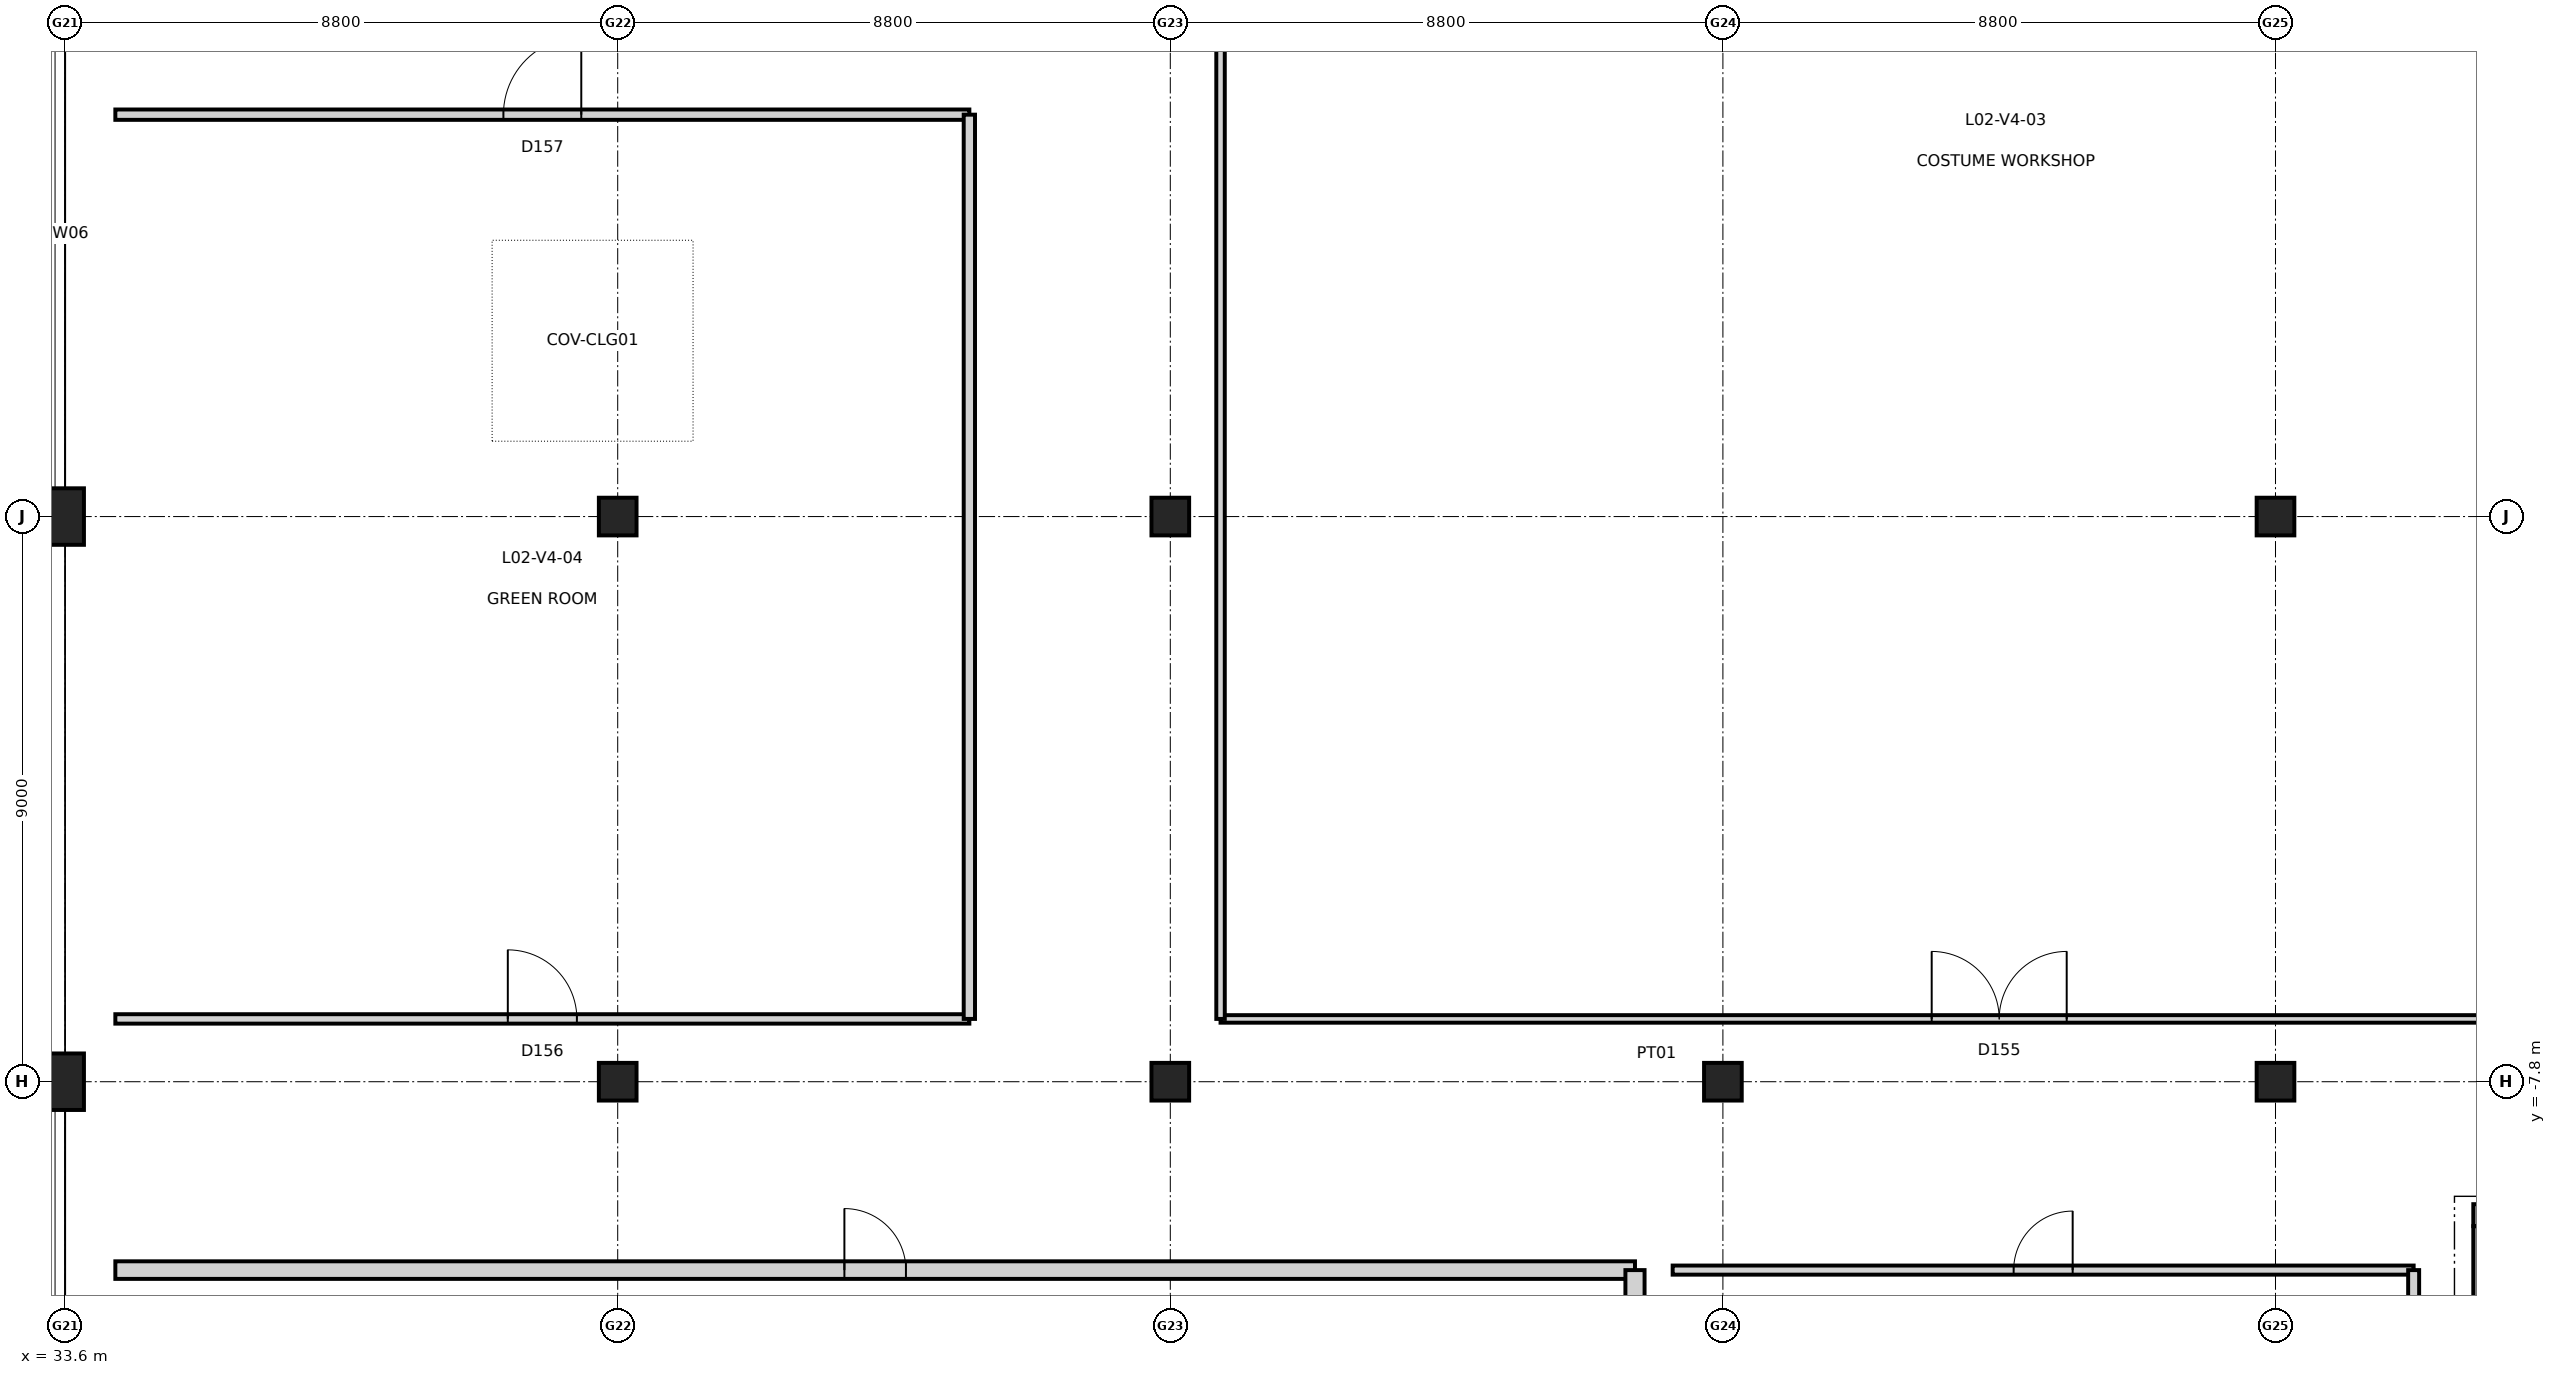
"""IFC4 building model, lengths in metres.
Left out: names, types, materials, properties, quantities, classifications, styles, units other than length and angle.
Written with IfcOpenShell. Run it as: python <this file> out.ifc"""

import sys

from ifc_helpers import new_model, si_unit, direction, frame, frame_2d, origin, origin_2d, place, context, subcontext, project, spatial, rectangle, extrude, element, fill, save


model = new_model("IFC4")
c1 = context("Model", 3, precision=1e-05, world=origin(), true_north=direction((0.0, 1.0)))
c2 = subcontext(c1, "Body", "Model", "MODEL_VIEW")
j1 = project(units=[si_unit("LENGTHUNIT", "METRE"), si_unit("PLANEANGLEUNIT", "RADIAN")], contexts=[c1])
p1 = place(None, origin())
s1 = spatial("IfcSite", under=j1, at=p1, CompositionType="ELEMENT")
p2 = place(p1, origin())
s2 = spatial("IfcBuilding", under=s1, at=p2, CompositionType="ELEMENT")
p3 = place(p2, frame((0.0, 0.0, 10.2)))
s3 = spatial("IfcBuildingStorey", under=s2, at=p3, CompositionType="ELEMENT", Elevation=10.2)
for number, where, z_axis, x_axis in (
    (1, (33.6, -7.8, 0.0), (0.0, 0.0, 1.0), (1.0, 0.0, 0.0)),
    (2, (33.6, 1.2, 0.0), (0.0, 0.0, 1.0), (1.0, 0.0, 0.0)),
):
    element("IfcColumn", number, at=place(p3, frame(where, z_axis=z_axis, x_axis=x_axis)), inside=s3, PredefinedType="COLUMN", context=c2, shape_type="SweptSolid", body=[
        extrude(rectangle(XDim=0.6, YDim=0.9, at=origin_2d()), origin(), (0.0, 0.0, 1.0), 4.8),
    ])
for number, where, z_axis, x_axis in (
    (3, (42.4, -7.8, 0.0), (0.0, 0.0, 1.0), (1.0, 0.0, 0.0)),
    (4, (42.4, 1.2, 0.0), (0.0, 0.0, 1.0), (1.0, 0.0, 0.0)),
    (5, (51.2, -7.8, 0.0), (0.0, 0.0, 1.0), (1.0, 0.0, 0.0)),
    (6, (51.2, 1.2, 0.0), (0.0, 0.0, 1.0), (1.0, 0.0, 0.0)),
    (7, (60.0, -7.8, 0.0), (0.0, 0.0, 1.0), (1.0, 0.0, 0.0)),
    (8, (68.8, -7.8, 0.0), (0.0, 0.0, 1.0), (1.0, 0.0, 0.0)),
    (9, (68.8, 1.2, 0.0), (0.0, 0.0, 1.0), (1.0, 0.0, 0.0)),
):
    element("IfcColumn", number, at=place(p3, frame(where, z_axis=z_axis, x_axis=x_axis)), inside=s3, PredefinedType="COLUMN", context=c2, shape_type="SweptSolid", body=[
        extrude(rectangle(XDim=0.6, YDim=0.6, at=origin_2d()), origin(), (0.0, 0.0, 1.0), 4.8),
    ])
p4 = place(p3, frame((72.125, -18.4, 0.0), z_axis=(0.0, 0.0, 1.0), x_axis=(0.0, 1.0, 0.0)))
e10 = element("IfcWall", 10, at=p4, inside=s3, PredefinedType="SHEAR", context=c2, shape_type="SweptSolid", body=[
    extrude(rectangle(XDim=8.3, YDim=0.35, at=frame_2d((4.15, 0.0))), origin(), (0.0, 0.0, 1.0), 4.8),
])
p5 = place(p4, frame((0.35, 0.0, 0.0)))
e11 = element("IfcOpeningElement", 11, at=p5, cuts=e10, PredefinedType="OPENING", context=c2, shape_type="SweptSolid", body=[
    extrude(rectangle(XDim=1.18, YDim=2.15, at=frame_2d((0.59, 1.075))), frame((0.0, 0.185, 0.0), z_axis=(0.0, -1.0, 0.0), x_axis=(1.0, 0.0, 0.0)), (0.0, 0.0, 1.0), 0.37),
])
p6 = place(p3, frame((71.95, -9.925, 0.0), z_axis=(0.0, 0.0, 1.0), x_axis=(1.0, 0.0, 0.0)))
e12 = element("IfcWall", 12, at=p6, inside=s3, PredefinedType="SHEAR", context=c2, shape_type="SweptSolid", body=[
    extrude(rectangle(XDim=4.6, YDim=0.35, at=frame_2d((2.3, 0.0))), origin(), (0.0, 0.0, 1.0), 4.8),
])
p7 = place(p3, frame((34.4, -10.8, 0.0), z_axis=(0.0, 0.0, 1.0), x_axis=(1.0, 0.0, 0.0)))
e13 = element("IfcWall", 13, at=p7, inside=s3, PredefinedType="PARTITIONING", context=c2, shape_type="SweptSolid", body=[
    extrude(rectangle(XDim=24.2, YDim=0.28, at=frame_2d((12.1, 0.0))), origin(), (0.0, 0.0, 1.0), 4.42),
])
p8 = place(p7, frame((11.61, 0.0, 0.0)))
e14 = element("IfcOpeningElement", 14, at=p8, cuts=e13, PredefinedType="OPENING", context=c2, shape_type="SweptSolid", body=[
    extrude(rectangle(XDim=0.98, YDim=2.15, at=frame_2d((0.49, 1.075))), frame((0.0, 0.15, 0.0), z_axis=(0.0, -1.0, 0.0), x_axis=(1.0, 0.0, 0.0)), (0.0, 0.0, 1.0), 0.3),
])
p9 = place(p3, frame((58.6, -28.0, 0.0), z_axis=(0.0, 0.0, 1.0), x_axis=(0.0, 1.0, 0.0)))
e15 = element("IfcWall", 15, at=p9, inside=s3, PredefinedType="PARTITIONING", context=c2, shape_type="SweptSolid", body=[
    extrude(rectangle(XDim=17.2, YDim=0.305, at=frame_2d((8.6, 0.0))), origin(), (0.0, 0.0, 1.0), 4.42),
])
p10 = place(p3, frame((59.2, -10.8, 0.0), z_axis=(0.0, 0.0, 1.0), x_axis=(1.0, 0.0, 0.0)))
e16 = element("IfcWall", 16, at=p10, inside=s3, PredefinedType="PARTITIONING", context=c2, shape_type="SweptSolid", body=[
    extrude(rectangle(XDim=11.8, YDim=0.145, at=frame_2d((5.9, 0.0))), origin(), (0.0, 0.0, 1.0), 4.42),
])
p11 = place(p10, frame((5.43, 0.0, 0.0)))
e17 = element("IfcOpeningElement", 17, at=p11, cuts=e16, PredefinedType="OPENING", context=c2, shape_type="SweptSolid", body=[
    extrude(rectangle(XDim=0.94, YDim=2.1, at=frame_2d((0.47, 1.05))), frame((0.0, 0.083, 0.0), z_axis=(0.0, -1.0, 0.0), x_axis=(1.0, 0.0, 0.0)), (0.0, 0.0, 1.0), 0.165),
])
p12 = place(p3, frame((71.0, -28.0, 0.0), z_axis=(0.0, 0.0, 1.0), x_axis=(0.0, 1.0, 0.0)))
e18 = element("IfcWall", 18, at=p12, inside=s3, PredefinedType="PARTITIONING", context=c2, shape_type="SweptSolid", body=[
    extrude(rectangle(XDim=17.2, YDim=0.175, at=frame_2d((8.6, 0.0))), origin(), (0.0, 0.0, 1.0), 4.42),
])
p13 = place(p3, frame((52.0, -6.8, 0.0), z_axis=(0.0, 0.0, 1.0), x_axis=(1.0, 0.0, 0.0)))
e19 = element("IfcWall", 19, at=p13, inside=s3, PredefinedType="PARTITIONING", context=c2, shape_type="SweptSolid", body=[
    extrude(rectangle(XDim=24.8, YDim=0.12, at=frame_2d((12.4, 0.0))), origin(), (0.0, 0.0, 1.0), 4.42),
])
p14 = place(p13, frame((11.325, 0.0, 0.0)))
e20 = element("IfcOpeningElement", 20, at=p14, cuts=e19, PredefinedType="OPENING", context=c2, shape_type="SweptSolid", body=[
    extrude(rectangle(XDim=2.15, YDim=2.4, at=frame_2d((1.075, 1.2))), frame((0.0, 0.07, 0.0), z_axis=(0.0, -1.0, 0.0), x_axis=(1.0, 0.0, 0.0)), (0.0, 0.0, 1.0), 0.14),
])
p15 = place(p3, frame((52.0, -6.8, 0.0), z_axis=(0.0, 0.0, 1.0), x_axis=(0.0, 1.0, 0.0)))
e21 = element("IfcWall", 21, at=p15, inside=s3, PredefinedType="PARTITIONING", context=c2, shape_type="SweptSolid", body=[
    extrude(rectangle(XDim=31.2, YDim=0.135, at=frame_2d((15.6, 0.0))), origin(), (0.0, 0.0, 1.0), 4.42),
])
p16 = place(p3, frame((34.4, -6.8, 0.0), z_axis=(0.0, 0.0, 1.0), x_axis=(1.0, 0.0, 0.0)))
e22 = element("IfcWall", 22, at=p16, inside=s3, PredefinedType="PARTITIONING", context=c2, shape_type="SweptSolid", body=[
    extrude(rectangle(XDim=13.6, YDim=0.15, at=frame_2d((6.8, 0.0))), origin(), (0.0, 0.0, 1.0), 4.42),
])
p17 = place(p16, frame((6.25, 0.0, 0.0)))
e23 = element("IfcOpeningElement", 23, at=p17, cuts=e22, PredefinedType="OPENING", context=c2, shape_type="SweptSolid", body=[
    extrude(rectangle(XDim=1.1, YDim=2.2, at=frame_2d((0.55, 1.1))), frame((0.0, 0.085, 0.0), z_axis=(0.0, -1.0, 0.0), x_axis=(1.0, 0.0, 0.0)), (0.0, 0.0, 1.0), 0.17),
])
p18 = place(p3, frame((34.4, 7.6, 0.0), z_axis=(0.0, 0.0, 1.0), x_axis=(1.0, 0.0, 0.0)))
e24 = element("IfcWall", 24, at=p18, inside=s3, PredefinedType="PARTITIONING", context=c2, shape_type="SweptSolid", body=[
    extrude(rectangle(XDim=13.6, YDim=0.165, at=frame_2d((6.8, 0.0))), origin(), (0.0, 0.0, 1.0), 4.42),
])
p19 = place(p18, frame((6.18, 0.0, 0.0)))
e25 = element("IfcOpeningElement", 25, at=p19, cuts=e24, PredefinedType="OPENING", context=c2, shape_type="SweptSolid", body=[
    extrude(rectangle(XDim=1.24, YDim=2.2, at=frame_2d((0.62, 1.1))), frame((0.0, 0.093, 0.0), z_axis=(0.0, -1.0, 0.0), x_axis=(1.0, 0.0, 0.0)), (0.0, 0.0, 1.0), 0.185),
])
p20 = place(p3, frame((48.0, -6.8, 0.0), z_axis=(0.0, 0.0, 1.0), x_axis=(0.0, 1.0, 0.0)))
e26 = element("IfcWall", 26, at=p20, inside=s3, PredefinedType="PARTITIONING", context=c2, shape_type="SweptSolid", body=[
    extrude(rectangle(XDim=14.4, YDim=0.18, at=frame_2d((7.2, 0.0))), origin(), (0.0, 0.0, 1.0), 3.977),
])
p21 = place(p8, origin())
e27 = element("IfcDoor", 27, at=p21, inside=s3, OperationType="SINGLE_SWING_LEFT", PredefinedType="DOOR", context=c2, shape_type="SweptSolid", body=[
    extrude(rectangle(XDim=0.98, YDim=2.15, at=frame_2d((0.49, 1.075))), frame((0.0, 0.025, 0.0), z_axis=(0.0, -1.0, 0.0), x_axis=(1.0, 0.0, 0.0)), (0.0, 0.0, 1.0), 0.05),
])
fill(e14, e27)
p22 = place(p11, origin())
e28 = element("IfcDoor", 28, at=p22, inside=s3, OperationType="SINGLE_SWING_RIGHT", PredefinedType="DOOR", context=c2, shape_type="SweptSolid", body=[
    extrude(rectangle(XDim=0.94, YDim=2.1, at=frame_2d((0.47, 1.05))), frame((0.0, 0.025, 0.0), z_axis=(0.0, -1.0, 0.0), x_axis=(1.0, 0.0, 0.0)), (0.0, 0.0, 1.0), 0.05),
])
fill(e17, e28)
p23 = place(p14, origin())
e29 = element("IfcDoor", 29, at=p23, inside=s3, OperationType="DOUBLE_DOOR_SINGLE_SWING", PredefinedType="DOOR", context=c2, shape_type="SweptSolid", body=[
    extrude(rectangle(XDim=2.15, YDim=2.4, at=frame_2d((1.075, 1.2))), frame((0.0, 0.025, 0.0), z_axis=(0.0, -1.0, 0.0), x_axis=(1.0, 0.0, 0.0)), (0.0, 0.0, 1.0), 0.05),
])
fill(e20, e29)
p24 = place(p17, origin())
e30 = element("IfcDoor", 30, at=p24, inside=s3, OperationType="SINGLE_SWING_LEFT", PredefinedType="DOOR", context=c2, shape_type="SweptSolid", body=[
    extrude(rectangle(XDim=1.1, YDim=2.2, at=frame_2d((0.55, 1.1))), frame((0.0, 0.025, 0.0), z_axis=(0.0, -1.0, 0.0), x_axis=(1.0, 0.0, 0.0)), (0.0, 0.0, 1.0), 0.05),
])
fill(e23, e30)
p25 = place(p19, origin())
e31 = element("IfcDoor", 31, at=p25, inside=s3, OperationType="SINGLE_SWING_RIGHT", PredefinedType="DOOR", context=c2, shape_type="SweptSolid", body=[
    extrude(rectangle(XDim=1.24, YDim=2.2, at=frame_2d((0.62, 1.1))), frame((0.0, 0.025, 0.0), z_axis=(0.0, -1.0, 0.0), x_axis=(1.0, 0.0, 0.0)), (0.0, 0.0, 1.0), 0.05),
])
fill(e25, e31)
save(model, sys.argv[1])
